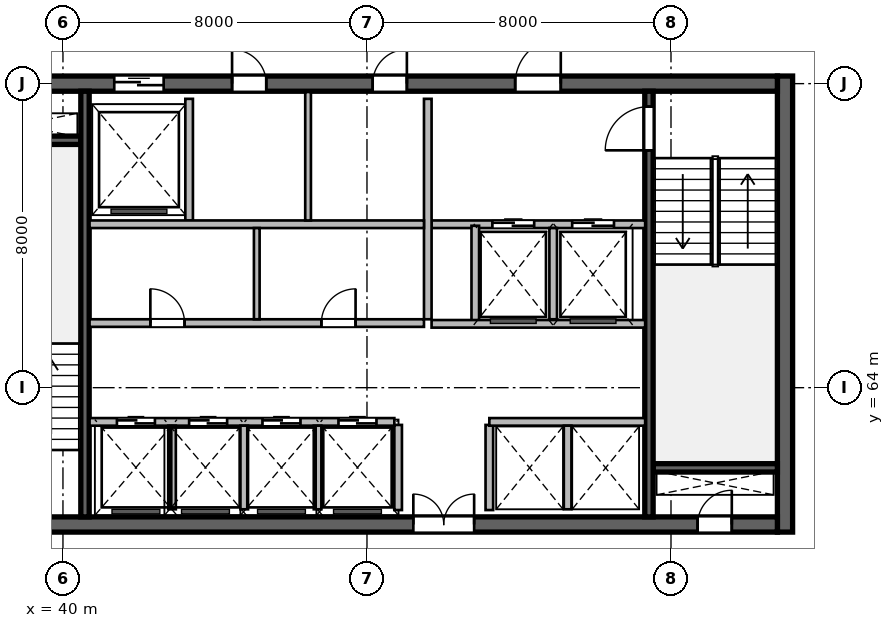
"""IFC4 building model, lengths in metres.
Left out: names, types, materials, properties, quantities, classifications, styles, units other than length and angle.
Written with IfcOpenShell. Run it as: python <this file> out.ifc"""

import sys

from ifc_helpers import new_model, si_unit, direction, frame, frame_2d, origin, place, context, subcontext, project, spatial, rectangle, extrude, source, transform, mapped, element, fill, save


model = new_model("IFC4")
c1 = context("Model", 3, precision=1e-05, world=origin(), true_north=direction((0.0, 1.0)))
c2 = subcontext(c1, "Body", "Model", "MODEL_VIEW")
j1 = project(units=[si_unit("LENGTHUNIT", "METRE"), si_unit("PLANEANGLEUNIT", "RADIAN")], contexts=[c1])
p1 = place(None, origin())
s1 = spatial("IfcSite", under=j1, at=p1, CompositionType="ELEMENT")
p2 = place(p1, origin())
s2 = spatial("IfcBuilding", under=s1, at=p2, CompositionType="ELEMENT")
p3 = place(p2, frame((0.0, 0.0, 299.1)))
s3 = spatial("IfcBuildingStorey", under=s2, at=p3, CompositionType="ELEMENT", Elevation=299.1)
m1 = source(origin(), c2, "Body", "SweptSolid", [
    extrude(rectangle(XDim=12.0, YDim=0.4, at=frame_2d((6.0, 0.0))), origin(), (0.0, 0.0, 1.0), 3.9),
])
p4 = place(p3, frame((59.0, 60.2, 0.0), z_axis=(0.0, 0.0, 1.0), x_axis=(0.0, 1.0, 0.0)))
e1 = element("IfcWall", 1, at=p4, inside=s3, PredefinedType="SHEAR", context=c2, shape_type="MappedRepresentation", body=[
    mapped(m1, transform((0.0, 0.0, 0.0), scale=1.0)),
])
m2 = source(origin(), c2, "Body", "SweptSolid", [
    extrude(rectangle(XDim=21.6, YDim=0.4, at=frame_2d((10.8, 0.0))), origin(), (0.0, 0.0, 1.0), 3.9),
])
p5 = place(p3, frame((37.2, 60.4, 0.0), z_axis=(0.0, 0.0, 1.0), x_axis=(1.0, 0.0, 0.0)))
e2 = element("IfcWall", 2, at=p5, inside=s3, PredefinedType="SHEAR", context=c2, shape_type="MappedRepresentation", body=[
    mapped(m2, transform((0.0, 0.0, 0.0), scale=1.0)),
])
p6 = place(p5, frame((1.1, 0.0, 0.0)))
e3 = element("IfcOpeningElement", 3, at=p6, cuts=e2, PredefinedType="OPENING", context=c2, shape_type="SweptSolid", body=[
    extrude(rectangle(XDim=1.15, YDim=2.15, at=frame_2d((0.575, 1.075))), frame((0.0, 0.21, 0.0), z_axis=(0.0, -1.0, 0.0), x_axis=(1.0, 0.0, 0.0)), (0.0, 0.0, 1.0), 0.42),
])
p7 = place(p5, frame((19.5, 0.0, 0.0)))
e4 = element("IfcOpeningElement", 4, at=p7, cuts=e2, PredefinedType="OPENING", context=c2, shape_type="SweptSolid", body=[
    extrude(rectangle(XDim=0.9, YDim=2.1, at=frame_2d((0.45, 1.05))), frame((0.0, 0.21, 0.0), z_axis=(0.0, -1.0, 0.0), x_axis=(1.0, 0.0, 0.0)), (0.0, 0.0, 1.0), 0.42),
])
p8 = place(p5, frame((12.02, 0.0, 0.0)))
e5 = element("IfcOpeningElement", 5, at=p8, cuts=e2, PredefinedType="OPENING", context=c2, shape_type="SweptSolid", body=[
    extrude(rectangle(XDim=1.6, YDim=2.15, at=frame_2d((0.8, 1.075))), frame((0.0, 0.21, 0.0), z_axis=(0.0, -1.0, 0.0), x_axis=(1.0, 0.0, 0.0)), (0.0, 0.0, 1.0), 0.42),
])
p9 = place(p3, frame((37.2, 72.0, 0.0), z_axis=(0.0, 0.0, 1.0), x_axis=(1.0, 0.0, 0.0)))
e6 = element("IfcWall", 6, at=p9, inside=s3, PredefinedType="SHEAR", context=c2, shape_type="MappedRepresentation", body=[
    mapped(m2, transform((0.0, 0.0, 0.0), scale=1.0)),
])
p10 = place(p9, frame((1.2, 0.0, 0.0)))
e7 = element("IfcOpeningElement", 7, at=p10, cuts=e6, PredefinedType="OPENING", context=c2, shape_type="SweptSolid", body=[
    extrude(rectangle(XDim=0.9, YDim=2.1, at=frame_2d((0.45, 1.05))), frame((0.0, 0.21, 0.0), z_axis=(0.0, -1.0, 0.0), x_axis=(1.0, 0.0, 0.0)), (0.0, 0.0, 1.0), 0.42),
])
p11 = place(p9, frame((14.7, 0.0, 0.0)))
e8 = element("IfcOpeningElement", 8, at=p11, cuts=e6, PredefinedType="OPENING", context=c2, shape_type="SweptSolid", body=[
    extrude(rectangle(XDim=1.2, YDim=2.15, at=frame_2d((0.6, 1.075))), frame((0.0, 0.21, 0.0), z_axis=(0.0, -1.0, 0.0), x_axis=(1.0, 0.0, 0.0)), (0.0, 0.0, 1.0), 0.42),
])
p12 = place(p9, frame((4.15, 0.0, 0.0)))
e9 = element("IfcOpeningElement", 9, at=p12, cuts=e6, PredefinedType="OPENING", context=c2, shape_type="SweptSolid", body=[
    extrude(rectangle(XDim=1.3, YDim=2.15, at=frame_2d((0.65, 1.075))), frame((0.0, 0.21, 0.0), z_axis=(0.0, -1.0, 0.0), x_axis=(1.0, 0.0, 0.0)), (0.0, 0.0, 1.0), 0.42),
])
p13 = place(p9, frame((7.25, 0.0, 0.0)))
e10 = element("IfcOpeningElement", 10, at=p13, cuts=e6, PredefinedType="OPENING", context=c2, shape_type="SweptSolid", body=[
    extrude(rectangle(XDim=0.9, YDim=2.1, at=frame_2d((0.45, 1.05))), frame((0.0, 0.21, 0.0), z_axis=(0.0, -1.0, 0.0), x_axis=(1.0, 0.0, 0.0)), (0.0, 0.0, 1.0), 0.42),
])
p14 = place(p9, frame((10.95, 0.0, 0.0)))
e11 = element("IfcOpeningElement", 11, at=p14, cuts=e6, PredefinedType="OPENING", context=c2, shape_type="SweptSolid", body=[
    extrude(rectangle(XDim=0.9, YDim=2.1, at=frame_2d((0.45, 1.05))), frame((0.0, 0.21, 0.0), z_axis=(0.0, -1.0, 0.0), x_axis=(1.0, 0.0, 0.0)), (0.0, 0.0, 1.0), 0.42),
])
m3 = source(origin(), c2, "Body", "SweptSolid", [
    extrude(rectangle(XDim=3.27, YDim=0.22, at=frame_2d((1.635, 0.0))), origin(), (0.0, 0.0, 1.0), 3.9),
])
for number, where, z_axis, x_axis in (
    (12, (37.2, 70.51, 0.0), (0.0, 0.0, 1.0), (1.0, 0.0, 0.0)),
    (13, (55.53, 61.89, 0.0), (0.0, 0.0, 1.0), (1.0, 0.0, 0.0)),
):
    element("IfcWall", number, at=place(p3, frame(where, z_axis=z_axis, x_axis=x_axis)), inside=s3, PredefinedType="SHEAR", context=c2, shape_type="MappedRepresentation", body=[
        mapped(m3, transform((0.0, 0.0, 0.0), scale=1.0)),
    ])
m4 = source(origin(), c2, "Body", "SweptSolid", [
    extrude(rectangle(XDim=11.2, YDim=0.22, at=frame_2d((5.6, 0.0))), origin(), (0.0, 0.0, 1.0), 3.9),
])
p15 = place(p3, frame((40.58, 60.6, 0.0), z_axis=(0.0, 0.0, 1.0), x_axis=(0.0, 1.0, 0.0)))
e14 = element("IfcWall", 14, at=p15, inside=s3, PredefinedType="SHEAR", context=c2, shape_type="MappedRepresentation", body=[
    mapped(m4, transform((0.0, 0.0, 0.0), scale=1.0)),
])
p16 = place(p3, frame((55.42, 60.6, 0.0), z_axis=(0.0, 0.0, 1.0), x_axis=(0.0, 1.0, 0.0)))
e15 = element("IfcWall", 15, at=p16, inside=s3, PredefinedType="SHEAR", context=c2, shape_type="MappedRepresentation", body=[
    mapped(m4, transform((0.0, 0.0, 0.0), scale=1.0)),
])
p17 = place(p16, frame((9.645, 0.0, 0.0)))
e16 = element("IfcOpeningElement", 16, at=p17, cuts=e15, PredefinedType="OPENING", context=c2, shape_type="SweptSolid", body=[
    extrude(rectangle(XDim=1.15, YDim=2.15, at=frame_2d((0.575, 1.075))), frame((0.0, 0.12, 0.0), z_axis=(0.0, -1.0, 0.0), x_axis=(1.0, 0.0, 0.0)), (0.0, 0.0, 1.0), 0.24),
])
m5 = source(origin(), c2, "Body", "SweptSolid", [
    extrude(rectangle(XDim=2.24, YDim=0.2, at=frame_2d((1.12, 0.0))), origin(), (0.0, 0.0, 1.0), 3.64),
])
for number, where, z_axis, x_axis in (
    (17, (48.82, 60.78, 0.0), (0.0, 0.0, 1.0), (0.0, 1.0, 0.0)),
    (18, (51.22, 60.78, 0.0), (0.0, 0.0, 1.0), (0.0, 1.0, 0.0)),
):
    element("IfcWall", number, at=place(p3, frame(where, z_axis=z_axis, x_axis=x_axis)), inside=s3, PredefinedType="SOLIDWALL", context=c2, shape_type="MappedRepresentation", body=[
        mapped(m5, transform((0.0, 0.0, 0.0), scale=1.0)),
    ])
m6 = source(origin(), c2, "Body", "SweptSolid", [
    extrude(rectangle(XDim=5.62, YDim=0.2, at=frame_2d((2.81, 0.0))), origin(), (0.0, 0.0, 1.0), 3.64),
])
p18 = place(p3, frame((49.7, 68.3, 0.0), z_axis=(0.0, 0.0, 1.0), x_axis=(1.0, 0.0, 0.0)))
e19 = element("IfcWall", 19, at=p18, inside=s3, PredefinedType="SOLIDWALL", context=c2, shape_type="MappedRepresentation", body=[
    mapped(m6, transform((0.0, 0.0, 0.0), scale=1.0)),
])
p19 = place(p18, frame((1.6, 0.0, 0.0)))
e20 = element("IfcOpeningElement", 20, at=p19, cuts=e19, PredefinedType="OPENING", context=c2, shape_type="SweptSolid", body=[
    extrude(rectangle(XDim=1.1, YDim=2.15, at=frame_2d((0.55, 1.075))), frame((0.0, 0.11, 0.0), z_axis=(0.0, -1.0, 0.0), x_axis=(1.0, 0.0, 0.0)), (0.0, 0.0, 1.0), 0.22),
])
p20 = place(p18, frame((3.7, 0.0, 0.0)))
e21 = element("IfcOpeningElement", 21, at=p20, cuts=e19, PredefinedType="OPENING", context=c2, shape_type="SweptSolid", body=[
    extrude(rectangle(XDim=1.1, YDim=2.15, at=frame_2d((0.55, 1.075))), frame((0.0, 0.11, 0.0), z_axis=(0.0, -1.0, 0.0), x_axis=(1.0, 0.0, 0.0)), (0.0, 0.0, 1.0), 0.22),
])
m7 = source(origin(), c2, "Body", "SweptSolid", [
    extrude(rectangle(XDim=5.8, YDim=0.2, at=frame_2d((2.9, 0.0))), origin(), (0.0, 0.0, 1.0), 3.64),
])
p21 = place(p3, frame((49.6, 65.8, 0.0), z_axis=(0.0, 0.0, 1.0), x_axis=(0.0, 1.0, 0.0)))
e22 = element("IfcWall", 22, at=p21, inside=s3, PredefinedType="SOLIDWALL", context=c2, shape_type="MappedRepresentation", body=[
    mapped(m7, transform((0.0, 0.0, 0.0), scale=1.0)),
])
m8 = source(origin(), c2, "Body", "SweptSolid", [
    extrude(rectangle(XDim=2.58, YDim=0.2, at=frame_2d((1.29, 0.0))), origin(), (0.0, 0.0, 1.0), 3.64),
])
p22 = place(p3, frame((50.85, 65.68, 0.0), z_axis=(0.0, 0.0, 1.0), x_axis=(0.0, 1.0, 0.0)))
e23 = element("IfcWall", 23, at=p22, inside=s3, PredefinedType="SOLIDWALL", context=c2, shape_type="MappedRepresentation", body=[
    mapped(m8, transform((0.0, 0.0, 0.0), scale=1.0)),
])
m9 = source(origin(), c2, "Body", "SweptSolid", [
    extrude(rectangle(XDim=2.4, YDim=0.2, at=frame_2d((1.2, 0.0))), origin(), (0.0, 0.0, 1.0), 3.64),
])
p23 = place(p3, frame((52.9, 65.8, 0.0), z_axis=(0.0, 0.0, 1.0), x_axis=(0.0, 1.0, 0.0)))
e24 = element("IfcWall", 24, at=p23, inside=s3, PredefinedType="SOLIDWALL", context=c2, shape_type="MappedRepresentation", body=[
    mapped(m9, transform((0.0, 0.0, 0.0), scale=1.0)),
])
p24 = place(p3, frame((49.7, 65.68, 0.0), z_axis=(0.0, 0.0, 1.0), x_axis=(1.0, 0.0, 0.0)))
e25 = element("IfcWall", 25, at=p24, inside=s3, PredefinedType="SOLIDWALL", context=c2, shape_type="MappedRepresentation", body=[
    mapped(m6, transform((0.0, 0.0, 0.0), scale=1.0)),
])
m10 = source(origin(), c2, "Body", "SweptSolid", [
    extrude(rectangle(XDim=3.2, YDim=0.2, at=frame_2d((1.6, 0.0))), origin(), (0.0, 0.0, 1.0), 3.64),
])
p25 = place(p3, frame((43.32, 68.4, 0.0), z_axis=(0.0, 0.0, 1.0), x_axis=(0.0, 1.0, 0.0)))
e26 = element("IfcWall", 26, at=p25, inside=s3, PredefinedType="SOLIDWALL", context=c2, shape_type="MappedRepresentation", body=[
    mapped(m10, transform((0.0, 0.0, 0.0), scale=1.0)),
])
m11 = source(origin(), c2, "Body", "SweptSolid", [
    extrude(rectangle(XDim=8.8, YDim=0.2, at=frame_2d((4.4, 0.0))), origin(), (0.0, 0.0, 1.0), 3.64),
])
p26 = place(p3, frame((40.7, 68.3, 0.0), z_axis=(0.0, 0.0, 1.0), x_axis=(1.0, 0.0, 0.0)))
e27 = element("IfcWall", 27, at=p26, inside=s3, PredefinedType="SOLIDWALL", context=c2, shape_type="MappedRepresentation", body=[
    mapped(m11, transform((0.0, 0.0, 0.0), scale=1.0)),
])
m12 = source(origin(), c2, "Body", "SweptSolid", [
    extrude(rectangle(XDim=3.38, YDim=0.15, at=frame_2d((1.69, 0.0))), origin(), (0.0, 0.0, 1.0), 3.64),
])
p27 = place(p3, frame((46.45, 68.4, 0.0), z_axis=(0.0, 0.0, 1.0), x_axis=(0.0, 1.0, 0.0)))
e28 = element("IfcWall", 28, at=p27, inside=s3, PredefinedType="PARTITIONING", context=c2, shape_type="MappedRepresentation", body=[
    mapped(m12, transform((0.0, 0.0, 0.0), scale=1.0)),
])
m13 = source(origin(), c2, "Body", "SweptSolid", [
    extrude(rectangle(XDim=8.02, YDim=0.2, at=frame_2d((4.01, 0.0))), origin(), (0.0, 0.0, 1.0), 3.64),
])
p28 = place(p3, frame((40.7, 63.1, 0.0), z_axis=(0.0, 0.0, 1.0), x_axis=(1.0, 0.0, 0.0)))
e29 = element("IfcWall", 29, at=p28, inside=s3, PredefinedType="SOLIDWALL", context=c2, shape_type="MappedRepresentation", body=[
    mapped(m13, transform((0.0, 0.0, 0.0), scale=1.0)),
])
p29 = place(p28, frame((0.72, 0.0, 0.0)))
e30 = element("IfcOpeningElement", 30, at=p29, cuts=e29, PredefinedType="OPENING", context=c2, shape_type="SweptSolid", body=[
    extrude(rectangle(XDim=1.0, YDim=2.15, at=frame_2d((0.5, 1.075))), frame((0.0, 0.11, 0.0), z_axis=(0.0, -1.0, 0.0), x_axis=(1.0, 0.0, 0.0)), (0.0, 0.0, 1.0), 0.22),
])
p30 = place(p28, frame((2.62, 0.0, 0.0)))
e31 = element("IfcOpeningElement", 31, at=p30, cuts=e29, PredefinedType="OPENING", context=c2, shape_type="SweptSolid", body=[
    extrude(rectangle(XDim=1.0, YDim=2.15, at=frame_2d((0.5, 1.075))), frame((0.0, 0.11, 0.0), z_axis=(0.0, -1.0, 0.0), x_axis=(1.0, 0.0, 0.0)), (0.0, 0.0, 1.0), 0.22),
])
p31 = place(p28, frame((4.55, 0.0, 0.0)))
e32 = element("IfcOpeningElement", 32, at=p31, cuts=e29, PredefinedType="OPENING", context=c2, shape_type="SweptSolid", body=[
    extrude(rectangle(XDim=1.0, YDim=2.15, at=frame_2d((0.5, 1.075))), frame((0.0, 0.11, 0.0), z_axis=(0.0, -1.0, 0.0), x_axis=(1.0, 0.0, 0.0)), (0.0, 0.0, 1.0), 0.22),
])
p32 = place(p28, frame((6.55, 0.0, 0.0)))
e33 = element("IfcOpeningElement", 33, at=p32, cuts=e29, PredefinedType="OPENING", context=c2, shape_type="SweptSolid", body=[
    extrude(rectangle(XDim=1.0, YDim=2.15, at=frame_2d((0.5, 1.075))), frame((0.0, 0.11, 0.0), z_axis=(0.0, -1.0, 0.0), x_axis=(1.0, 0.0, 0.0)), (0.0, 0.0, 1.0), 0.22),
])
m14 = source(origin(), c2, "Body", "SweptSolid", [
    extrude(rectangle(XDim=4.1, YDim=0.2, at=frame_2d((2.05, 0.0))), origin(), (0.0, 0.0, 1.0), 3.64),
])
p33 = place(p3, frame((51.22, 63.1, 0.0), z_axis=(0.0, 0.0, 1.0), x_axis=(1.0, 0.0, 0.0)))
e34 = element("IfcWall", 34, at=p33, inside=s3, PredefinedType="SOLIDWALL", context=c2, shape_type="MappedRepresentation", body=[
    mapped(m14, transform((0.0, 0.0, 0.0), scale=1.0)),
])
m15 = source(origin(), c2, "Body", "SweptSolid", [
    extrude(rectangle(XDim=2.2, YDim=0.2, at=frame_2d((1.1, 0.0))), origin(), (0.0, 0.0, 1.0), 3.64),
])
for number, where, z_axis, x_axis in (
    (35, (42.87, 60.8, 0.0), (0.0, 0.0, 1.0), (0.0, 1.0, 0.0)),
    (36, (44.77, 60.8, 0.0), (0.0, 0.0, 1.0), (0.0, 1.0, 0.0)),
    (37, (46.7, 60.8, 0.0), (0.0, 0.0, 1.0), (0.0, 1.0, 0.0)),
    (38, (53.28, 60.8, 0.0), (0.0, 0.0, 1.0), (0.0, 1.0, 0.0)),
):
    element("IfcWall", number, at=place(p3, frame(where, z_axis=z_axis, x_axis=x_axis)), inside=s3, PredefinedType="SOLIDWALL", context=c2, shape_type="MappedRepresentation", body=[
        mapped(m15, transform((0.0, 0.0, 0.0), scale=1.0)),
    ])
p34 = place(p3, frame((40.7, 65.7, 0.0), z_axis=(0.0, 0.0, 1.0), x_axis=(1.0, 0.0, 0.0)))
e39 = element("IfcWall", 39, at=p34, inside=s3, PredefinedType="SOLIDWALL", context=c2, shape_type="MappedRepresentation", body=[
    mapped(m11, transform((0.0, 0.0, 0.0), scale=1.0)),
])
p35 = place(p34, frame((1.6, 0.0, 0.0)))
e40 = element("IfcOpeningElement", 40, at=p35, cuts=e39, PredefinedType="OPENING", context=c2, shape_type="SweptSolid", body=[
    extrude(rectangle(XDim=0.9, YDim=2.1, at=frame_2d((0.45, 1.05))), frame((0.0, 0.11, 0.0), z_axis=(0.0, -1.0, 0.0), x_axis=(1.0, 0.0, 0.0)), (0.0, 0.0, 1.0), 0.22),
])
p36 = place(p34, frame((6.1, 0.0, 0.0)))
e41 = element("IfcOpeningElement", 41, at=p36, cuts=e39, PredefinedType="OPENING", context=c2, shape_type="SweptSolid", body=[
    extrude(rectangle(XDim=0.9, YDim=2.1, at=frame_2d((0.45, 1.05))), frame((0.0, 0.11, 0.0), z_axis=(0.0, -1.0, 0.0), x_axis=(1.0, 0.0, 0.0)), (0.0, 0.0, 1.0), 0.22),
])
m16 = source(origin(), c2, "Body", "SweptSolid", [
    extrude(rectangle(XDim=2.4, YDim=0.15, at=frame_2d((1.2, 0.0))), origin(), (0.0, 0.0, 1.0), 3.64),
])
p37 = place(p3, frame((45.1, 65.8, 0.0), z_axis=(0.0, 0.0, 1.0), x_axis=(0.0, 1.0, 0.0)))
e42 = element("IfcWall", 42, at=p37, inside=s3, PredefinedType="PARTITIONING", context=c2, shape_type="MappedRepresentation", body=[
    mapped(m16, transform((0.0, 0.0, 0.0), scale=1.0)),
])
m17 = source(origin(), c2, "Body", "SweptSolid", [
    extrude(rectangle(XDim=0.9, YDim=2.1, at=frame_2d((0.45, 1.05))), frame((0.0, 0.025, 0.0), z_axis=(0.0, -1.0, 0.0), x_axis=(1.0, 0.0, 0.0)), (0.0, 0.0, 1.0), 0.05),
])
p38 = place(p7, origin())
e43 = element("IfcDoor", 43, at=p38, inside=s3, OperationType="SINGLE_SWING_RIGHT", PredefinedType="DOOR", context=c2, shape_type="MappedRepresentation", body=[
    mapped(m17, transform((0.0, 0.0, 0.0), scale=1.0)),
])
fill(e4, e43)
m18 = source(origin(), c2, "Body", "SweptSolid", [
    extrude(rectangle(XDim=1.15, YDim=2.15, at=frame_2d((0.575, 1.075))), frame((0.0, 0.025, 0.0), z_axis=(0.0, -1.0, 0.0), x_axis=(1.0, 0.0, 0.0)), (0.0, 0.0, 1.0), 0.05),
])
p39 = place(p17, origin())
e44 = element("IfcDoor", 44, at=p39, inside=s3, OperationType="SINGLE_SWING_LEFT", PredefinedType="DOOR", context=c2, shape_type="MappedRepresentation", body=[
    mapped(m18, transform((0.0, 0.0, 0.0), scale=1.0)),
])
fill(e16, e44)
m19 = source(origin(), c2, "Body", "SweptSolid", [
    extrude(rectangle(XDim=1.6, YDim=2.15, at=frame_2d((0.8, 1.075))), frame((0.0, 0.025, 0.0), z_axis=(0.0, -1.0, 0.0), x_axis=(1.0, 0.0, 0.0)), (0.0, 0.0, 1.0), 0.05),
])
p40 = place(p8, origin())
e45 = element("IfcDoor", 45, at=p40, inside=s3, OperationType="DOUBLE_DOOR_SINGLE_SWING", PredefinedType="DOOR", context=c2, shape_type="MappedRepresentation", body=[
    mapped(m19, transform((0.0, 0.0, 0.0), scale=1.0)),
])
fill(e5, e45)
m20 = source(origin(), c2, "Body", "SweptSolid", [
    extrude(rectangle(XDim=1.2, YDim=2.15, at=frame_2d((0.6, 1.075))), frame((0.0, 0.025, 0.0), z_axis=(0.0, -1.0, 0.0), x_axis=(1.0, 0.0, 0.0)), (0.0, 0.0, 1.0), 0.05),
])
p41 = place(p11, origin())
e46 = element("IfcDoor", 46, at=p41, inside=s3, OperationType="SINGLE_SWING_RIGHT", PredefinedType="DOOR", context=c2, shape_type="MappedRepresentation", body=[
    mapped(m20, transform((0.0, 0.0, 0.0), scale=1.0)),
])
fill(e8, e46)
m21 = source(origin(), c2, "Body", "SweptSolid", [
    extrude(rectangle(XDim=1.1, YDim=2.15, at=frame_2d((0.55, 1.075))), frame((0.0, 0.025, 0.0), z_axis=(0.0, -1.0, 0.0), x_axis=(1.0, 0.0, 0.0)), (0.0, 0.0, 1.0), 0.05),
])
p42 = place(p19, origin())
e47 = element("IfcDoor", 47, at=p42, inside=s3, OperationType="DOUBLE_DOOR_SLIDING", PredefinedType="DOOR", context=c2, shape_type="MappedRepresentation", body=[
    mapped(m21, transform((0.0, 0.0, 0.0), scale=1.0)),
])
fill(e20, e47)
p43 = place(p20, origin())
e48 = element("IfcDoor", 48, at=p43, inside=s3, OperationType="DOUBLE_DOOR_SLIDING", PredefinedType="DOOR", context=c2, shape_type="MappedRepresentation", body=[
    mapped(m21, transform((0.0, 0.0, 0.0), scale=1.0)),
])
fill(e21, e48)
m22 = source(origin(), c2, "Body", "SweptSolid", [
    extrude(rectangle(XDim=1.3, YDim=2.15, at=frame_2d((0.65, 1.075))), frame((0.0, 0.025, 0.0), z_axis=(0.0, -1.0, 0.0), x_axis=(1.0, 0.0, 0.0)), (0.0, 0.0, 1.0), 0.05),
])
p44 = place(p12, origin())
e49 = element("IfcDoor", 49, at=p44, inside=s3, OperationType="DOUBLE_DOOR_SLIDING", PredefinedType="DOOR", context=c2, shape_type="MappedRepresentation", body=[
    mapped(m22, transform((0.0, 0.0, 0.0), scale=1.0)),
])
fill(e9, e49)
p45 = place(p13, origin())
e50 = element("IfcDoor", 50, at=p45, inside=s3, OperationType="SINGLE_SWING_LEFT", PredefinedType="DOOR", context=c2, shape_type="MappedRepresentation", body=[
    mapped(m17, transform((0.0, 0.0, 0.0), scale=1.0)),
])
fill(e10, e50)
p46 = place(p14, origin())
e51 = element("IfcDoor", 51, at=p46, inside=s3, OperationType="SINGLE_SWING_RIGHT", PredefinedType="DOOR", context=c2, shape_type="MappedRepresentation", body=[
    mapped(m17, transform((0.0, 0.0, 0.0), scale=1.0)),
])
fill(e11, e51)
m23 = source(origin(), c2, "Body", "SweptSolid", [
    extrude(rectangle(XDim=1.0, YDim=2.15, at=frame_2d((0.5, 1.075))), frame((0.0, 0.025, 0.0), z_axis=(0.0, -1.0, 0.0), x_axis=(1.0, 0.0, 0.0)), (0.0, 0.0, 1.0), 0.05),
])
p47 = place(p29, origin())
e52 = element("IfcDoor", 52, at=p47, inside=s3, OperationType="DOUBLE_DOOR_SLIDING", PredefinedType="DOOR", context=c2, shape_type="MappedRepresentation", body=[
    mapped(m23, transform((0.0, 0.0, 0.0), scale=1.0)),
])
fill(e30, e52)
p48 = place(p30, origin())
e53 = element("IfcDoor", 53, at=p48, inside=s3, OperationType="DOUBLE_DOOR_SLIDING", PredefinedType="DOOR", context=c2, shape_type="MappedRepresentation", body=[
    mapped(m23, transform((0.0, 0.0, 0.0), scale=1.0)),
])
fill(e31, e53)
p49 = place(p31, origin())
e54 = element("IfcDoor", 54, at=p49, inside=s3, OperationType="DOUBLE_DOOR_SLIDING", PredefinedType="DOOR", context=c2, shape_type="MappedRepresentation", body=[
    mapped(m23, transform((0.0, 0.0, 0.0), scale=1.0)),
])
fill(e32, e54)
p50 = place(p32, origin())
e55 = element("IfcDoor", 55, at=p50, inside=s3, OperationType="DOUBLE_DOOR_SLIDING", PredefinedType="DOOR", context=c2, shape_type="MappedRepresentation", body=[
    mapped(m23, transform((0.0, 0.0, 0.0), scale=1.0)),
])
fill(e33, e55)
p51 = place(p35, origin())
e56 = element("IfcDoor", 56, at=p51, inside=s3, OperationType="SINGLE_SWING_LEFT", PredefinedType="DOOR", context=c2, shape_type="MappedRepresentation", body=[
    mapped(m17, transform((0.0, 0.0, 0.0), scale=1.0)),
])
fill(e40, e56)
p52 = place(p36, origin())
e57 = element("IfcDoor", 57, at=p52, inside=s3, OperationType="SINGLE_SWING_RIGHT", PredefinedType="DOOR", context=c2, shape_type="MappedRepresentation", body=[
    mapped(m17, transform((0.0, 0.0, 0.0), scale=1.0)),
])
fill(e41, e57)
save(model, sys.argv[1])
